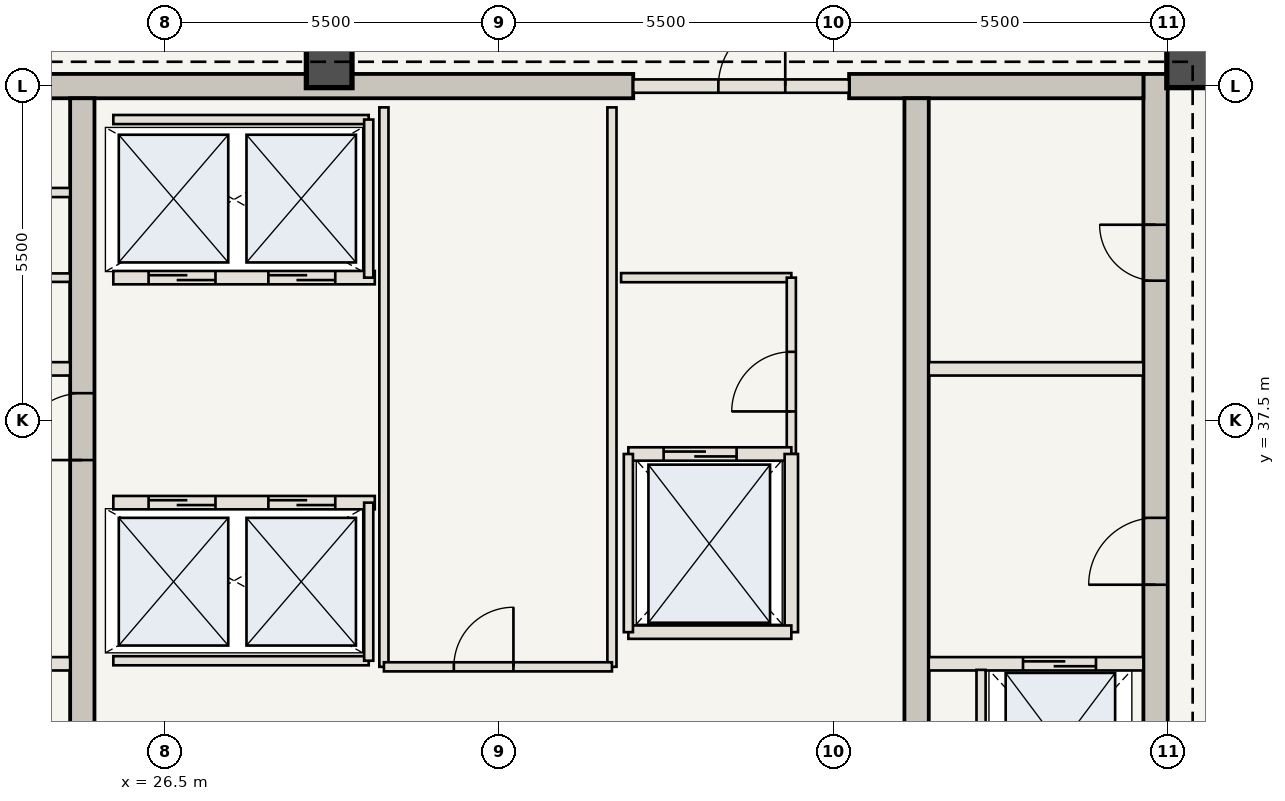
"""IFC4 building model, lengths in metres.
Left out: names, types, materials, properties, quantities, classifications, styles, units other than length and angle.
Written with IfcOpenShell. Run it as: python <this file> out.ifc"""

import sys

from ifc_helpers import new_model, si_unit, direction, frame, frame_2d, origin, origin_2d, place, context, subcontext, project, spatial, rectangle, extrude, element, fill, save


model = new_model("IFC4")
c1 = context("Model", 3, precision=1e-05, world=origin(), true_north=direction((0.0, 1.0)))
c2 = subcontext(c1, "Body", "Model", "MODEL_VIEW")
j1 = project(units=[si_unit("LENGTHUNIT", "METRE"), si_unit("PLANEANGLEUNIT", "RADIAN")], contexts=[c1])
p1 = place(None, origin())
s1 = spatial("IfcSite", under=j1, at=p1, CompositionType="ELEMENT")
p2 = place(p1, origin())
s2 = spatial("IfcBuilding", under=s1, at=p2, CompositionType="ELEMENT")
p3 = place(p2, frame((0.0, 0.0, 273.7)))
s3 = spatial("IfcBuildingStorey", under=s2, at=p3, CompositionType="ELEMENT", Elevation=273.7)
p4 = place(p3, frame((42.79, 30.6, 0.0), z_axis=(0.0, 0.0, 1.0), x_axis=(0.0, 1.0, 0.0)))
e1 = element("IfcWall", 1, at=p4, inside=s3, PredefinedType="SHEAR", context=c2, shape_type="SweptSolid", body=[
    extrude(rectangle(XDim=12.6, YDim=0.4, at=frame_2d((6.3, 0.0))), origin(), (0.0, 0.0, 1.0), 3.85),
])
p5 = place(p4, frame((4.2, 0.0, 0.0)))
e2 = element("IfcOpeningElement", 2, at=p5, cuts=e1, PredefinedType="OPENING", context=c2, shape_type="SweptSolid", body=[
    extrude(rectangle(XDim=1.1, YDim=2.15, at=frame_2d((0.55, 1.075))), frame((0.0, 0.21, 0.0), z_axis=(0.0, -1.0, 0.0), x_axis=(1.0, 0.0, 0.0)), (0.0, 0.0, 1.0), 0.42),
])
p6 = place(p4, frame((9.2, 0.0, 0.0)))
e3 = element("IfcOpeningElement", 3, at=p6, cuts=e1, PredefinedType="OPENING", context=c2, shape_type="SweptSolid", body=[
    extrude(rectangle(XDim=0.92, YDim=2.1, at=frame_2d((0.46, 1.05))), frame((0.0, 0.21, 0.0), z_axis=(0.0, -1.0, 0.0), x_axis=(1.0, 0.0, 0.0)), (0.0, 0.0, 1.0), 0.42),
])
p7 = place(p3, frame((21.41, 43.0, 0.0), z_axis=(0.0, 0.0, 1.0), x_axis=(1.0, 0.0, 0.0)))
e4 = element("IfcWall", 4, at=p7, inside=s3, PredefinedType="SHEAR", context=c2, shape_type="SweptSolid", body=[
    extrude(rectangle(XDim=12.79, YDim=0.4, at=frame_2d((6.395, 0.0))), origin(), (0.0, 0.0, 1.0), 3.85),
])
p8 = place(p3, frame((37.75, 43.0, 0.0), z_axis=(0.0, 0.0, 1.0), x_axis=(1.0, 0.0, 0.0)))
e5 = element("IfcWall", 5, at=p8, inside=s3, PredefinedType="SHEAR", context=c2, shape_type="SweptSolid", body=[
    extrude(rectangle(XDim=4.84, YDim=0.4, at=frame_2d((2.42, 0.0))), origin(), (0.0, 0.0, 1.0), 3.85),
])
p9 = place(p3, frame((25.14, 30.6, 0.0), z_axis=(0.0, 0.0, 1.0), x_axis=(0.0, 1.0, 0.0)))
e6 = element("IfcWall", 6, at=p9, inside=s3, PredefinedType="SHEAR", context=c2, shape_type="SweptSolid", body=[
    extrude(rectangle(XDim=12.2, YDim=0.4, at=frame_2d((6.1, 0.0))), origin(), (0.0, 0.0, 1.0), 3.85),
])
p10 = place(p9, frame((6.25, 0.0, 0.0)))
e7 = element("IfcOpeningElement", 7, at=p10, cuts=e6, PredefinedType="OPENING", context=c2, shape_type="SweptSolid", body=[
    extrude(rectangle(XDim=1.1, YDim=2.15, at=frame_2d((0.55, 1.075))), frame((0.0, 0.21, 0.0), z_axis=(0.0, -1.0, 0.0), x_axis=(1.0, 0.0, 0.0)), (0.0, 0.0, 1.0), 0.42),
])
p11 = place(p3, frame((38.86, 30.6, 0.0), z_axis=(0.0, 0.0, 1.0), x_axis=(0.0, 1.0, 0.0)))
e8 = element("IfcWall", 8, at=p11, inside=s3, PredefinedType="SHEAR", context=c2, shape_type="SweptSolid", body=[
    extrude(rectangle(XDim=12.2, YDim=0.4, at=frame_2d((6.1, 0.0))), origin(), (0.0, 0.0, 1.0), 3.85),
])
for number, where, z_axis, x_axis in (
    (9, (43.35, 43.35, 0.0), (0.0, 0.0, 1.0), (1.0, 0.0, 0.0)),
    (10, (29.2, 43.35, 0.0), (0.0, 0.0, 1.0), (1.0, 0.0, 0.0)),
):
    element("IfcColumn", number, at=place(p3, frame(where, z_axis=z_axis, x_axis=x_axis)), inside=s3, PredefinedType="COLUMN", context=c2, shape_type="SweptSolid", body=[
        extrude(rectangle(XDim=0.75, YDim=0.75, at=origin_2d()), origin(), (0.0, 0.0, 1.0), 3.85),
    ])
p12 = place(p3, frame((21.41, 33.5, 0.0), z_axis=(0.0, 0.0, 1.0), x_axis=(1.0, 0.0, 0.0)))
e11 = element("IfcWall", 11, at=p12, inside=s3, PredefinedType="STANDARD", context=c2, shape_type="SweptSolid", body=[
    extrude(rectangle(XDim=3.53, YDim=0.22, at=frame_2d((1.765, 0.0))), origin(), (0.0, 0.0, 1.0), 3.685),
])
p13 = place(p12, frame((0.75, 0.0, 0.0)))
e12 = element("IfcOpeningElement", 12, at=p13, cuts=e11, PredefinedType="OPENING", context=c2, shape_type="SweptSolid", body=[
    extrude(rectangle(XDim=1.2, YDim=2.2, at=frame_2d((0.6, 1.1))), frame((0.0, 0.12, 0.0), z_axis=(0.0, -1.0, 0.0), x_axis=(1.0, 0.0, 0.0)), (0.0, 0.0, 1.0), 0.24),
])
p14 = place(p3, frame((39.06, 33.5, 0.0), z_axis=(0.0, 0.0, 1.0), x_axis=(1.0, 0.0, 0.0)))
e13 = element("IfcWall", 13, at=p14, inside=s3, PredefinedType="STANDARD", context=c2, shape_type="SweptSolid", body=[
    extrude(rectangle(XDim=3.53, YDim=0.22, at=frame_2d((1.765, 0.0))), origin(), (0.0, 0.0, 1.0), 3.685),
])
p15 = place(p14, frame((1.55, 0.0, 0.0)))
e14 = element("IfcOpeningElement", 14, at=p15, cuts=e13, PredefinedType="OPENING", context=c2, shape_type="SweptSolid", body=[
    extrude(rectangle(XDim=1.2, YDim=2.2, at=frame_2d((0.6, 1.1))), frame((0.0, 0.12, 0.0), z_axis=(0.0, -1.0, 0.0), x_axis=(1.0, 0.0, 0.0)), (0.0, 0.0, 1.0), 0.24),
])
p16 = place(p3, frame((39.92, 30.75, 0.0), z_axis=(0.0, 0.0, 1.0), x_axis=(0.0, 1.0, 0.0)))
e15 = element("IfcWall", 15, at=p16, inside=s3, PredefinedType="STANDARD", context=c2, shape_type="SweptSolid", body=[
    extrude(rectangle(XDim=2.65, YDim=0.15, at=frame_2d((1.325, 0.0))), origin(), (0.0, 0.0, 1.0), 3.685),
])
for number, where, z_axis, x_axis in (
    (16, (21.41, 38.35, 0.0), (0.0, 0.0, 1.0), (1.0, 0.0, 0.0)),
    (17, (39.06, 38.35, 0.0), (0.0, 0.0, 1.0), (1.0, 0.0, 0.0)),
):
    element("IfcWall", number, at=place(p3, frame(where, z_axis=z_axis, x_axis=x_axis)), inside=s3, PredefinedType="STANDARD", context=c2, shape_type="SweptSolid", body=[
        extrude(rectangle(XDim=3.53, YDim=0.22, at=frame_2d((1.765, 0.0))), origin(), (0.0, 0.0, 1.0), 3.685),
    ])
p17 = place(p3, frame((21.41, 39.85, 0.0), z_axis=(0.0, 0.0, 1.0), x_axis=(1.0, 0.0, 0.0)))
e18 = element("IfcWall", 18, at=p17, inside=s3, PredefinedType="STANDARD", context=c2, shape_type="SweptSolid", body=[
    extrude(rectangle(XDim=3.53, YDim=0.14, at=frame_2d((1.765, 0.0))), origin(), (0.0, 0.0, 1.0), 3.685),
])
p18 = place(p3, frame((21.41, 41.25, 0.0), z_axis=(0.0, 0.0, 1.0), x_axis=(1.0, 0.0, 0.0)))
e19 = element("IfcWall", 19, at=p18, inside=s3, PredefinedType="STANDARD", context=c2, shape_type="SweptSolid", body=[
    extrude(rectangle(XDim=3.53, YDim=0.15, at=frame_2d((1.765, 0.0))), origin(), (0.0, 0.0, 1.0), 3.685),
])
p19 = place(p3, frame((34.0, 39.85, 0.0), z_axis=(0.0, 0.0, 1.0), x_axis=(1.0, 0.0, 0.0)))
e20 = element("IfcWall", 20, at=p19, inside=s3, PredefinedType="STANDARD", context=c2, shape_type="SweptSolid", body=[
    extrude(rectangle(XDim=2.8, YDim=0.15, at=frame_2d((1.4, 0.0))), origin(), (0.0, 0.0, 1.0), 3.685),
])
p20 = place(p3, frame((36.8, 36.95, 0.0), z_axis=(0.0, 0.0, 1.0), x_axis=(0.0, 1.0, 0.0)))
e21 = element("IfcWall", 21, at=p20, inside=s3, PredefinedType="STANDARD", context=c2, shape_type="SweptSolid", body=[
    extrude(rectangle(XDim=2.9, YDim=0.15, at=frame_2d((1.45, 0.0))), origin(), (0.0, 0.0, 1.0), 3.685),
])
p21 = place(p20, frame((0.7, 0.0, 0.0)))
e22 = element("IfcOpeningElement", 22, at=p21, cuts=e21, PredefinedType="OPENING", context=c2, shape_type="SweptSolid", body=[
    extrude(rectangle(XDim=0.98, YDim=2.2, at=frame_2d((0.49, 1.1))), frame((0.0, 0.085, 0.0), z_axis=(0.0, -1.0, 0.0), x_axis=(1.0, 0.0, 0.0)), (0.0, 0.0, 1.0), 0.17),
])
p22 = place(p3, frame((25.65, 36.15, 0.0), z_axis=(0.0, 0.0, 1.0), x_axis=(1.0, 0.0, 0.0)))
e23 = element("IfcWall", 23, at=p22, inside=s3, PredefinedType="STANDARD", context=c2, shape_type="SweptSolid", body=[
    extrude(rectangle(XDim=4.3, YDim=0.22, at=frame_2d((2.15, 0.0))), origin(), (0.0, 0.0, 1.0), 3.685),
])
p23 = place(p22, frame((0.58, 0.0, 0.0)))
e24 = element("IfcOpeningElement", 24, at=p23, cuts=e23, PredefinedType="OPENING", context=c2, shape_type="SweptSolid", body=[
    extrude(rectangle(XDim=1.1, YDim=2.15, at=frame_2d((0.55, 1.075))), frame((0.0, 0.12, 0.0), z_axis=(0.0, -1.0, 0.0), x_axis=(1.0, 0.0, 0.0)), (0.0, 0.0, 1.0), 0.24),
])
p24 = place(p22, frame((2.55, 0.0, 0.0)))
e25 = element("IfcOpeningElement", 25, at=p24, cuts=e23, PredefinedType="OPENING", context=c2, shape_type="SweptSolid", body=[
    extrude(rectangle(XDim=1.1, YDim=2.15, at=frame_2d((0.55, 1.075))), frame((0.0, 0.12, 0.0), z_axis=(0.0, -1.0, 0.0), x_axis=(1.0, 0.0, 0.0)), (0.0, 0.0, 1.0), 0.24),
])
p25 = place(p3, frame((25.65, 33.55, 0.0), z_axis=(0.0, 0.0, 1.0), x_axis=(1.0, 0.0, 0.0)))
e26 = element("IfcWall", 26, at=p25, inside=s3, PredefinedType="STANDARD", context=c2, shape_type="SweptSolid", body=[
    extrude(rectangle(XDim=4.2, YDim=0.15, at=frame_2d((2.1, 0.0))), origin(), (0.0, 0.0, 1.0), 3.685),
])
p26 = place(p3, frame((29.85, 33.55, 0.0), z_axis=(0.0, 0.0, 1.0), x_axis=(0.0, 1.0, 0.0)))
e27 = element("IfcWall", 27, at=p26, inside=s3, PredefinedType="STANDARD", context=c2, shape_type="SweptSolid", body=[
    extrude(rectangle(XDim=2.6, YDim=0.15, at=frame_2d((1.3, 0.0))), origin(), (0.0, 0.0, 1.0), 3.685),
])
p27 = place(p3, frame((25.65, 39.85, 0.0), z_axis=(0.0, 0.0, 1.0), x_axis=(1.0, 0.0, 0.0)))
e28 = element("IfcWall", 28, at=p27, inside=s3, PredefinedType="STANDARD", context=c2, shape_type="SweptSolid", body=[
    extrude(rectangle(XDim=4.3, YDim=0.22, at=frame_2d((2.15, 0.0))), origin(), (0.0, 0.0, 1.0), 3.685),
])
p28 = place(p27, frame((0.58, 0.0, 0.0)))
e29 = element("IfcOpeningElement", 29, at=p28, cuts=e28, PredefinedType="OPENING", context=c2, shape_type="SweptSolid", body=[
    extrude(rectangle(XDim=1.1, YDim=2.15, at=frame_2d((0.55, 1.075))), frame((0.0, 0.12, 0.0), z_axis=(0.0, -1.0, 0.0), x_axis=(1.0, 0.0, 0.0)), (0.0, 0.0, 1.0), 0.24),
])
p29 = place(p27, frame((2.55, 0.0, 0.0)))
e30 = element("IfcOpeningElement", 30, at=p29, cuts=e28, PredefinedType="OPENING", context=c2, shape_type="SweptSolid", body=[
    extrude(rectangle(XDim=1.1, YDim=2.15, at=frame_2d((0.55, 1.075))), frame((0.0, 0.12, 0.0), z_axis=(0.0, -1.0, 0.0), x_axis=(1.0, 0.0, 0.0)), (0.0, 0.0, 1.0), 0.24),
])
p30 = place(p3, frame((25.65, 42.45, 0.0), z_axis=(0.0, 0.0, 1.0), x_axis=(1.0, 0.0, 0.0)))
e31 = element("IfcWall", 31, at=p30, inside=s3, PredefinedType="STANDARD", context=c2, shape_type="SweptSolid", body=[
    extrude(rectangle(XDim=4.2, YDim=0.15, at=frame_2d((2.1, 0.0))), origin(), (0.0, 0.0, 1.0), 3.685),
])
p31 = place(p3, frame((29.85, 39.85, 0.0), z_axis=(0.0, 0.0, 1.0), x_axis=(0.0, 1.0, 0.0)))
e32 = element("IfcWall", 32, at=p31, inside=s3, PredefinedType="STANDARD", context=c2, shape_type="SweptSolid", body=[
    extrude(rectangle(XDim=2.6, YDim=0.15, at=frame_2d((1.3, 0.0))), origin(), (0.0, 0.0, 1.0), 3.685),
])
for number, where, z_axis, x_axis in (
    (33, (30.1, 33.45, 0.0), (0.0, 0.0, 1.0), (0.0, 1.0, 0.0)),
    (34, (33.85, 33.45, 0.0), (0.0, 0.0, 1.0), (0.0, 1.0, 0.0)),
):
    element("IfcWall", number, at=place(p3, frame(where, z_axis=z_axis, x_axis=x_axis)), inside=s3, PredefinedType="STANDARD", context=c2, shape_type="SweptSolid", body=[
        extrude(rectangle(XDim=9.2, YDim=0.15, at=frame_2d((4.6, 0.0))), origin(), (0.0, 0.0, 1.0), 3.685),
    ])
p32 = place(p3, frame((30.1, 33.45, 0.0), z_axis=(0.0, 0.0, 1.0), x_axis=(1.0, 0.0, 0.0)))
e35 = element("IfcWall", 35, at=p32, inside=s3, PredefinedType="STANDARD", context=c2, shape_type="SweptSolid", body=[
    extrude(rectangle(XDim=3.75, YDim=0.15, at=frame_2d((1.875, 0.0))), origin(), (0.0, 0.0, 1.0), 3.685),
])
p33 = place(p32, frame((1.15, 0.0, 0.0)))
e36 = element("IfcOpeningElement", 36, at=p33, cuts=e35, PredefinedType="OPENING", context=c2, shape_type="SweptSolid", body=[
    extrude(rectangle(XDim=0.98, YDim=2.2, at=frame_2d((0.49, 1.1))), frame((0.0, 0.085, 0.0), z_axis=(0.0, -1.0, 0.0), x_axis=(1.0, 0.0, 0.0)), (0.0, 0.0, 1.0), 0.17),
])
p34 = place(p3, frame((34.2, 43.0, 0.0), z_axis=(0.0, 0.0, 1.0), x_axis=(1.0, 0.0, 0.0)))
e37 = element("IfcWall", 37, at=p34, inside=s3, PredefinedType="STANDARD", context=c2, shape_type="SweptSolid", body=[
    extrude(rectangle(XDim=3.55, YDim=0.22, at=frame_2d((1.775, 0.0))), origin(), (0.0, 0.0, 1.0), 3.685),
])
p35 = place(p34, frame((1.4, 0.0, 0.0)))
e38 = element("IfcOpeningElement", 38, at=p35, cuts=e37, PredefinedType="OPENING", context=c2, shape_type="SweptSolid", body=[
    extrude(rectangle(XDim=1.1, YDim=2.15, at=frame_2d((0.55, 1.075))), frame((0.0, 0.12, 0.0), z_axis=(0.0, -1.0, 0.0), x_axis=(1.0, 0.0, 0.0)), (0.0, 0.0, 1.0), 0.24),
])
p36 = place(p3, frame((34.12, 36.95, 0.0), z_axis=(0.0, 0.0, 1.0), x_axis=(1.0, 0.0, 0.0)))
e39 = element("IfcWall", 39, at=p36, inside=s3, PredefinedType="STANDARD", context=c2, shape_type="SweptSolid", body=[
    extrude(rectangle(XDim=2.68, YDim=0.22, at=frame_2d((1.34, 0.0))), origin(), (0.0, 0.0, 1.0), 3.685),
])
p37 = place(p36, frame((0.58, 0.0, 0.0)))
e40 = element("IfcOpeningElement", 40, at=p37, cuts=e39, PredefinedType="OPENING", context=c2, shape_type="SweptSolid", body=[
    extrude(rectangle(XDim=1.2, YDim=2.2, at=frame_2d((0.6, 1.1))), frame((0.0, 0.12, 0.0), z_axis=(0.0, -1.0, 0.0), x_axis=(1.0, 0.0, 0.0)), (0.0, 0.0, 1.0), 0.24),
])
p38 = place(p3, frame((36.8, 34.02, 0.0), z_axis=(0.0, 0.0, 1.0), x_axis=(0.0, 1.0, 0.0)))
e41 = element("IfcWall", 41, at=p38, inside=s3, PredefinedType="STANDARD", context=c2, shape_type="SweptSolid", body=[
    extrude(rectangle(XDim=2.93, YDim=0.22, at=frame_2d((1.465, 0.0))), origin(), (0.0, 0.0, 1.0), 3.685),
])
p39 = place(p3, frame((34.12, 34.02, 0.0), z_axis=(0.0, 0.0, 1.0), x_axis=(1.0, 0.0, 0.0)))
e42 = element("IfcWall", 42, at=p39, inside=s3, PredefinedType="STANDARD", context=c2, shape_type="SweptSolid", body=[
    extrude(rectangle(XDim=2.68, YDim=0.22, at=frame_2d((1.34, 0.0))), origin(), (0.0, 0.0, 1.0), 3.685),
])
p40 = place(p3, frame((34.12, 34.02, 0.0), z_axis=(0.0, 0.0, 1.0), x_axis=(0.0, 1.0, 0.0)))
e43 = element("IfcWall", 43, at=p40, inside=s3, PredefinedType="STANDARD", context=c2, shape_type="SweptSolid", body=[
    extrude(rectangle(XDim=2.93, YDim=0.15, at=frame_2d((1.465, 0.0))), origin(), (0.0, 0.0, 1.0), 3.685),
])
p41 = place(p5, origin())
e44 = element("IfcDoor", 44, at=p41, inside=s3, OperationType="SINGLE_SWING_LEFT", PredefinedType="DOOR", context=c2, shape_type="SweptSolid", body=[
    extrude(rectangle(XDim=1.1, YDim=2.15, at=frame_2d((0.55, 1.075))), frame((0.0, 0.025, 0.0), z_axis=(0.0, -1.0, 0.0), x_axis=(1.0, 0.0, 0.0)), (0.0, 0.0, 1.0), 0.05),
])
fill(e2, e44)
p42 = place(p10, origin())
e45 = element("IfcDoor", 45, at=p42, inside=s3, OperationType="SINGLE_SWING_LEFT", PredefinedType="DOOR", context=c2, shape_type="SweptSolid", body=[
    extrude(rectangle(XDim=1.1, YDim=2.15, at=frame_2d((0.55, 1.075))), frame((0.0, 0.025, 0.0), z_axis=(0.0, -1.0, 0.0), x_axis=(1.0, 0.0, 0.0)), (0.0, 0.0, 1.0), 0.05),
])
fill(e7, e45)
p43 = place(p6, origin())
e46 = element("IfcDoor", 46, at=p43, inside=s3, OperationType="SINGLE_SWING_RIGHT", PredefinedType="DOOR", context=c2, shape_type="SweptSolid", body=[
    extrude(rectangle(XDim=0.92, YDim=2.1, at=frame_2d((0.46, 1.05))), frame((0.0, 0.025, 0.0), z_axis=(0.0, -1.0, 0.0), x_axis=(1.0, 0.0, 0.0)), (0.0, 0.0, 1.0), 0.05),
])
fill(e3, e46)
p44 = place(p15, origin())
e47 = element("IfcDoor", 47, at=p44, inside=s3, OperationType="DOUBLE_DOOR_SLIDING", PredefinedType="DOOR", context=c2, shape_type="SweptSolid", body=[
    extrude(rectangle(XDim=1.2, YDim=2.2, at=frame_2d((0.6, 1.1))), frame((0.0, 0.025, 0.0), z_axis=(0.0, -1.0, 0.0), x_axis=(1.0, 0.0, 0.0)), (0.0, 0.0, 1.0), 0.05),
])
fill(e14, e47)
p45 = place(p21, origin())
e48 = element("IfcDoor", 48, at=p45, inside=s3, OperationType="SINGLE_SWING_LEFT", PredefinedType="DOOR", context=c2, shape_type="SweptSolid", body=[
    extrude(rectangle(XDim=0.98, YDim=2.2, at=frame_2d((0.49, 1.1))), frame((0.0, 0.025, 0.0), z_axis=(0.0, -1.0, 0.0), x_axis=(1.0, 0.0, 0.0)), (0.0, 0.0, 1.0), 0.05),
])
fill(e22, e48)
p46 = place(p23, origin())
e49 = element("IfcDoor", 49, at=p46, inside=s3, OperationType="DOUBLE_DOOR_SLIDING", PredefinedType="DOOR", context=c2, shape_type="SweptSolid", body=[
    extrude(rectangle(XDim=1.1, YDim=2.15, at=frame_2d((0.55, 1.075))), frame((0.0, 0.025, 0.0), z_axis=(0.0, -1.0, 0.0), x_axis=(1.0, 0.0, 0.0)), (0.0, 0.0, 1.0), 0.05),
])
fill(e24, e49)
p47 = place(p24, origin())
e50 = element("IfcDoor", 50, at=p47, inside=s3, OperationType="DOUBLE_DOOR_SLIDING", PredefinedType="DOOR", context=c2, shape_type="SweptSolid", body=[
    extrude(rectangle(XDim=1.1, YDim=2.15, at=frame_2d((0.55, 1.075))), frame((0.0, 0.025, 0.0), z_axis=(0.0, -1.0, 0.0), x_axis=(1.0, 0.0, 0.0)), (0.0, 0.0, 1.0), 0.05),
])
fill(e25, e50)
p48 = place(p28, origin())
e51 = element("IfcDoor", 51, at=p48, inside=s3, OperationType="DOUBLE_DOOR_SLIDING", PredefinedType="DOOR", context=c2, shape_type="SweptSolid", body=[
    extrude(rectangle(XDim=1.1, YDim=2.15, at=frame_2d((0.55, 1.075))), frame((0.0, 0.025, 0.0), z_axis=(0.0, -1.0, 0.0), x_axis=(1.0, 0.0, 0.0)), (0.0, 0.0, 1.0), 0.05),
])
fill(e29, e51)
p49 = place(p29, origin())
e52 = element("IfcDoor", 52, at=p49, inside=s3, OperationType="DOUBLE_DOOR_SLIDING", PredefinedType="DOOR", context=c2, shape_type="SweptSolid", body=[
    extrude(rectangle(XDim=1.1, YDim=2.15, at=frame_2d((0.55, 1.075))), frame((0.0, 0.025, 0.0), z_axis=(0.0, -1.0, 0.0), x_axis=(1.0, 0.0, 0.0)), (0.0, 0.0, 1.0), 0.05),
])
fill(e30, e52)
p50 = place(p33, origin())
e53 = element("IfcDoor", 53, at=p50, inside=s3, OperationType="SINGLE_SWING_RIGHT", PredefinedType="DOOR", context=c2, shape_type="SweptSolid", body=[
    extrude(rectangle(XDim=0.98, YDim=2.2, at=frame_2d((0.49, 1.1))), frame((0.0, 0.025, 0.0), z_axis=(0.0, -1.0, 0.0), x_axis=(1.0, 0.0, 0.0)), (0.0, 0.0, 1.0), 0.05),
])
fill(e36, e53)
p51 = place(p35, origin())
e54 = element("IfcDoor", 54, at=p51, inside=s3, OperationType="SINGLE_SWING_RIGHT", PredefinedType="DOOR", context=c2, shape_type="SweptSolid", body=[
    extrude(rectangle(XDim=1.1, YDim=2.15, at=frame_2d((0.55, 1.075))), frame((0.0, 0.025, 0.0), z_axis=(0.0, -1.0, 0.0), x_axis=(1.0, 0.0, 0.0)), (0.0, 0.0, 1.0), 0.05),
])
fill(e38, e54)
p52 = place(p37, origin())
e55 = element("IfcDoor", 55, at=p52, inside=s3, OperationType="DOUBLE_DOOR_SLIDING", PredefinedType="DOOR", context=c2, shape_type="SweptSolid", body=[
    extrude(rectangle(XDim=1.2, YDim=2.2, at=frame_2d((0.6, 1.1))), frame((0.0, 0.025, 0.0), z_axis=(0.0, -1.0, 0.0), x_axis=(1.0, 0.0, 0.0)), (0.0, 0.0, 1.0), 0.05),
])
fill(e40, e55)
save(model, sys.argv[1])
